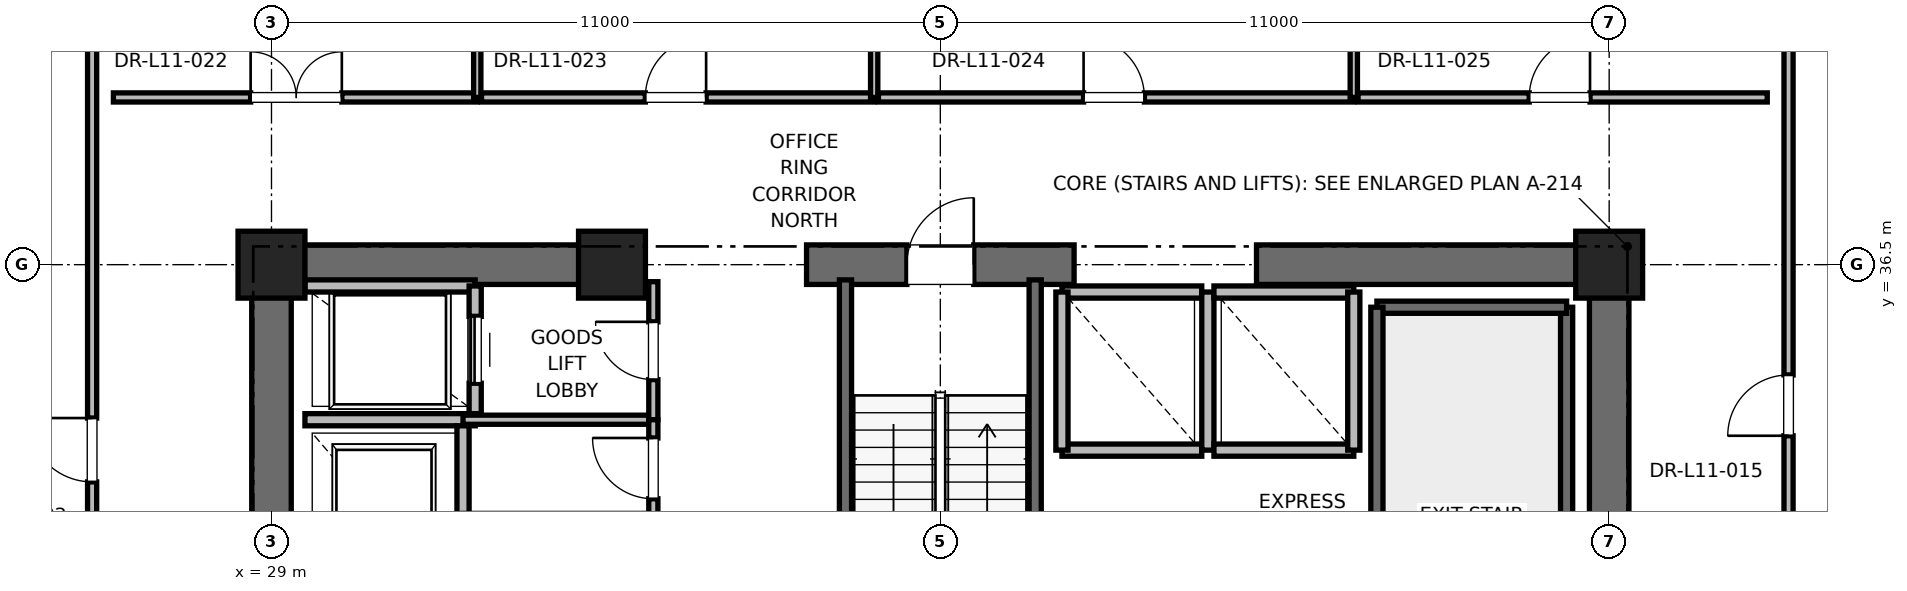
"""IFC4 building model, lengths in metres.
Left out: names, types, materials, properties, quantities, classifications, styles, units other than length and angle.
Written with IfcOpenShell. Run it as: python <this file> out.ifc"""

import sys

from ifc_helpers import new_model, si_unit, direction, frame, frame_2d, origin, origin_2d, place, context, subcontext, project, spatial, rectangle, extrude, element, fill, save


model = new_model("IFC4")
c1 = context("Model", 3, precision=1e-05, world=origin(), true_north=direction((0.0, 1.0)))
c2 = subcontext(c1, "Body", "Model", "MODEL_VIEW")
j1 = project(units=[si_unit("LENGTHUNIT", "METRE"), si_unit("PLANEANGLEUNIT", "RADIAN")], contexts=[c1])
p1 = place(None, origin())
s1 = spatial("IfcSite", under=j1, at=p1, CompositionType="ELEMENT")
p2 = place(p1, origin())
s2 = spatial("IfcBuilding", under=s1, at=p2, CompositionType="ELEMENT")
p3 = place(p2, frame((0.0, 0.0, 51.6)))
s3 = spatial("IfcBuildingStorey", under=s2, at=p3, CompositionType="ELEMENT", Elevation=51.6)
for number, where, z_axis, x_axis in (
    (1, (29.0, 36.5, 0.0), (0.0, 0.0, 1.0), (1.0, 0.0, 0.0)),
    (2, (51.0, 36.5, 0.0), (0.0, 0.0, 1.0), (1.0, 0.0, 0.0)),
    (3, (34.6, 36.5, 0.0), (0.0, 0.0, 1.0), (1.0, 0.0, 0.0)),
):
    element("IfcColumn", number, at=place(p3, frame(where, z_axis=z_axis, x_axis=x_axis)), inside=s3, PredefinedType="PILASTER", context=c2, shape_type="SweptSolid", body=[
        extrude(rectangle(XDim=1.1, YDim=1.1, at=origin_2d()), origin(), (0.0, 0.0, 1.0), 4.0),
    ])
p4 = place(p3, frame((29.0, 36.5, 0.0), z_axis=(0.0, 0.0, 1.0), x_axis=(1.0, 0.0, 0.0)))
e4 = element("IfcWall", 4, at=p4, inside=s3, PredefinedType="SHEAR", context=c2, shape_type="SweptSolid", body=[
    extrude(rectangle(XDim=5.8, YDim=0.65, at=frame_2d((2.9, 0.0))), origin(), (0.0, 0.0, 1.0), 3.76),
])
p5 = place(p3, frame((37.8, 36.5, 0.0), z_axis=(0.0, 0.0, 1.0), x_axis=(1.0, 0.0, 0.0)))
e5 = element("IfcWall", 5, at=p5, inside=s3, PredefinedType="SHEAR", context=c2, shape_type="SweptSolid", body=[
    extrude(rectangle(XDim=4.4, YDim=0.65, at=frame_2d((2.2, 0.0))), origin(), (0.0, 0.0, 1.0), 3.76),
])
p6 = place(p5, frame((1.65, 0.0, 0.0)))
e6 = element("IfcOpeningElement", 6, at=p6, cuts=e5, PredefinedType="OPENING", context=c2, shape_type="SweptSolid", body=[
    extrude(rectangle(XDim=1.1, YDim=2.15, at=frame_2d((0.55, 1.075))), frame((0.0, 0.325, 0.0), z_axis=(0.0, -1.0, 0.0), x_axis=(1.0, 0.0, 0.0)), (0.0, 0.0, 1.0), 0.65),
])
for number, where, z_axis, x_axis in (
    (7, (45.2, 36.5, 0.0), (0.0, 0.0, 1.0), (1.0, 0.0, 0.0)),
    (8, (29.0, 30.7, 0.0), (0.0, 0.0, 1.0), (0.0, 1.0, 0.0)),
):
    element("IfcWall", number, at=place(p3, frame(where, z_axis=z_axis, x_axis=x_axis)), inside=s3, PredefinedType="SHEAR", context=c2, shape_type="SweptSolid", body=[
        extrude(rectangle(XDim=5.8, YDim=0.65, at=frame_2d((2.9, 0.0))), origin(), (0.0, 0.0, 1.0), 3.76),
    ])
p7 = place(p3, frame((51.0, 27.7, 0.0), z_axis=(0.0, 0.0, 1.0), x_axis=(0.0, 1.0, 0.0)))
e9 = element("IfcWall", 9, at=p7, inside=s3, PredefinedType="SHEAR", context=c2, shape_type="SweptSolid", body=[
    extrude(rectangle(XDim=8.8, YDim=0.65, at=frame_2d((4.4, 0.0))), origin(), (0.0, 0.0, 1.0), 3.76),
])
p8 = place(p3, frame((50.3, 27.65, 0.0), z_axis=(0.0, 0.0, 1.0), x_axis=(0.0, 1.0, 0.0)))
e10 = element("IfcWall", 10, at=p8, inside=s3, PredefinedType="SOLIDWALL", context=c2, shape_type="SweptSolid", body=[
    extrude(rectangle(XDim=8.15, YDim=0.2, at=frame_2d((4.075, 0.0))), origin(), (0.0, 0.0, 1.0), 3.76),
])
p9 = place(p3, frame((47.18, 35.8, 0.0), z_axis=(0.0, 0.0, 1.0), x_axis=(1.0, 0.0, 0.0)))
e11 = element("IfcWall", 11, at=p9, inside=s3, PredefinedType="SOLIDWALL", context=c2, shape_type="SweptSolid", body=[
    extrude(rectangle(XDim=3.12, YDim=0.2, at=frame_2d((1.56, 0.0))), origin(), (0.0, 0.0, 1.0), 3.76),
])
p10 = place(p3, frame((47.18, 27.62, 0.0), z_axis=(0.0, 0.0, 1.0), x_axis=(0.0, 1.0, 0.0)))
e12 = element("IfcWall", 12, at=p10, inside=s3, PredefinedType="SOLIDWALL", context=c2, shape_type="SweptSolid", body=[
    extrude(rectangle(XDim=8.18, YDim=0.2, at=frame_2d((4.09, 0.0))), origin(), (0.0, 0.0, 1.0), 3.76),
])
p11 = place(p3, frame((38.44, 27.38, 0.0), z_axis=(0.0, 0.0, 1.0), x_axis=(0.0, 1.0, 0.0)))
e13 = element("IfcWall", 13, at=p11, inside=s3, PredefinedType="SOLIDWALL", context=c2, shape_type="SweptSolid", body=[
    extrude(rectangle(XDim=8.87, YDim=0.2, at=frame_2d((4.435, 0.0))), origin(), (0.0, 0.0, 1.0), 3.76),
])
p12 = place(p3, frame((41.56, 27.68, 0.0), z_axis=(0.0, 0.0, 1.0), x_axis=(0.0, 1.0, 0.0)))
e14 = element("IfcWall", 14, at=p12, inside=s3, PredefinedType="SOLIDWALL", context=c2, shape_type="SweptSolid", body=[
    extrude(rectangle(XDim=8.57, YDim=0.2, at=frame_2d((4.285, 0.0))), origin(), (0.0, 0.0, 1.0), 3.76),
])
p13 = place(p3, frame((29.55, 33.95, 0.0), z_axis=(0.0, 0.0, 1.0), x_axis=(1.0, 0.0, 0.0)))
e15 = element("IfcWall", 15, at=p13, inside=s3, PredefinedType="SOLIDWALL", context=c2, shape_type="SweptSolid", body=[
    extrude(rectangle(XDim=2.8, YDim=0.2, at=frame_2d((1.4, 0.0))), origin(), (0.0, 0.0, 1.0), 3.76),
])
p14 = place(p3, frame((32.15, 30.85, 0.0), z_axis=(0.0, 0.0, 1.0), x_axis=(0.0, 1.0, 0.0)))
e16 = element("IfcWall", 16, at=p14, inside=s3, PredefinedType="SOLIDWALL", context=c2, shape_type="SweptSolid", body=[
    extrude(rectangle(XDim=3.0, YDim=0.2, at=frame_2d((1.5, 0.0))), origin(), (0.0, 0.0, 1.0), 3.76),
])
p15 = place(p3, frame((32.35, 36.15, 0.0), z_axis=(0.0, 0.0, 1.0), x_axis=(-1.0, 0.0, 0.0)))
e17 = element("IfcWall", 17, at=p15, inside=s3, PredefinedType="SOLIDWALL", context=c2, shape_type="SweptSolid", body=[
    extrude(rectangle(XDim=2.8, YDim=0.2, at=frame_2d((1.4, 0.0))), origin(), (0.0, 0.0, 1.0), 2.889),
])
p16 = place(p3, frame((32.35, 34.05, 0.0), z_axis=(0.0, 0.0, 1.0), x_axis=(0.0, 1.0, 0.0)))
e18 = element("IfcWall", 18, at=p16, inside=s3, PredefinedType="SOLIDWALL", context=c2, shape_type="SweptSolid", body=[
    extrude(rectangle(XDim=2.1, YDim=0.2, at=frame_2d((1.05, 0.0))), origin(), (0.0, 0.0, 1.0), 3.76),
])
p17 = place(p16, frame((0.5, 0.0, 0.0)))
e19 = element("IfcOpeningElement", 19, at=p17, cuts=e18, PredefinedType="OPENING", context=c2, shape_type="SweptSolid", body=[
    extrude(rectangle(XDim=1.1, YDim=2.2, at=frame_2d((0.55, 1.1))), frame((0.0, 0.1, 0.0), z_axis=(0.0, -1.0, 0.0), x_axis=(1.0, 0.0, 0.0)), (0.0, 0.0, 1.0), 0.2),
])
p18 = place(p3, frame((42.0, 33.45, 0.0), z_axis=(0.0, 0.0, 1.0), x_axis=(1.0, 0.0, 0.0)))
e20 = element("IfcWall", 20, at=p18, inside=s3, PredefinedType="SOLIDWALL", context=c2, shape_type="SweptSolid", body=[
    extrude(rectangle(XDim=2.3, YDim=0.2, at=frame_2d((1.15, 0.0))), origin(), (0.0, 0.0, 1.0), 3.76),
])
p19 = place(p3, frame((44.3, 36.05, 0.0), z_axis=(0.0, 0.0, 1.0), x_axis=(-1.0, 0.0, 0.0)))
e21 = element("IfcWall", 21, at=p19, inside=s3, PredefinedType="SOLIDWALL", context=c2, shape_type="SweptSolid", body=[
    extrude(rectangle(XDim=2.3, YDim=0.2, at=frame_2d((1.15, 0.0))), origin(), (0.0, 0.0, 1.0), 2.54),
])
for number, where, z_axis, x_axis in (
    (22, (42.0, 36.05, 0.0), (0.0, 0.0, 1.0), (0.0, -1.0, 0.0)),
    (23, (44.4, 33.45, 0.0), (0.0, 0.0, 1.0), (0.0, 1.0, 0.0)),
):
    element("IfcWall", number, at=place(p3, frame(where, z_axis=z_axis, x_axis=x_axis)), inside=s3, PredefinedType="SOLIDWALL", context=c2, shape_type="SweptSolid", body=[
        extrude(rectangle(XDim=2.6, YDim=0.2, at=frame_2d((1.3, 0.0))), origin(), (0.0, 0.0, 1.0), 2.54),
    ])
p20 = place(p3, frame((44.5, 33.45, 0.0), z_axis=(0.0, 0.0, 1.0), x_axis=(1.0, 0.0, 0.0)))
e24 = element("IfcWall", 24, at=p20, inside=s3, PredefinedType="SOLIDWALL", context=c2, shape_type="SweptSolid", body=[
    extrude(rectangle(XDim=2.3, YDim=0.2, at=frame_2d((1.15, 0.0))), origin(), (0.0, 0.0, 1.0), 3.76),
])
p21 = place(p3, frame((46.8, 36.05, 0.0), z_axis=(0.0, 0.0, 1.0), x_axis=(-1.0, 0.0, 0.0)))
e25 = element("IfcWall", 25, at=p21, inside=s3, PredefinedType="SOLIDWALL", context=c2, shape_type="SweptSolid", body=[
    extrude(rectangle(XDim=2.3, YDim=0.2, at=frame_2d((1.15, 0.0))), origin(), (0.0, 0.0, 1.0), 2.54),
])
p22 = place(p3, frame((46.8, 33.45, 0.0), z_axis=(0.0, 0.0, 1.0), x_axis=(0.0, 1.0, 0.0)))
e26 = element("IfcWall", 26, at=p22, inside=s3, PredefinedType="SOLIDWALL", context=c2, shape_type="SweptSolid", body=[
    extrude(rectangle(XDim=2.6, YDim=0.2, at=frame_2d((1.3, 0.0))), origin(), (0.0, 0.0, 1.0), 3.76),
])
p23 = place(p3, frame((32.15, 33.95, 0.0), z_axis=(0.0, 0.0, 1.0), x_axis=(1.0, 0.0, 0.0)))
e27 = element("IfcWall", 27, at=p23, inside=s3, PredefinedType="PARTITIONING", context=c2, shape_type="SweptSolid", body=[
    extrude(rectangle(XDim=3.13, YDim=0.15, at=frame_2d((1.565, 0.0))), origin(), (0.0, 0.0, 1.0), 2.85),
])
p24 = place(p3, frame((35.28, 33.95, 0.0), z_axis=(0.0, 0.0, 1.0), x_axis=(0.0, 1.0, 0.0)))
e28 = element("IfcWall", 28, at=p24, inside=s3, PredefinedType="PARTITIONING", context=c2, shape_type="SweptSolid", body=[
    extrude(rectangle(XDim=2.27, YDim=0.15, at=frame_2d((1.135, 0.0))), origin(), (0.0, 0.0, 1.0), 2.54),
])
p25 = place(p24, frame((0.66, 0.0, 0.0)))
e29 = element("IfcOpeningElement", 29, at=p25, cuts=e28, PredefinedType="OPENING", context=c2, shape_type="SweptSolid", body=[
    extrude(rectangle(XDim=0.95, YDim=2.15, at=frame_2d((0.475, 1.075))), frame((0.0, 0.075, 0.0), z_axis=(0.0, -1.0, 0.0), x_axis=(1.0, 0.0, 0.0)), (0.0, 0.0, 1.0), 0.15),
])
p26 = place(p3, frame((35.28, 32.35, 0.0), z_axis=(0.0, 0.0, 1.0), x_axis=(0.0, 1.0, 0.0)))
e30 = element("IfcWall", 30, at=p26, inside=s3, PredefinedType="PARTITIONING", context=c2, shape_type="SweptSolid", body=[
    extrude(rectangle(XDim=1.6, YDim=0.15, at=frame_2d((0.8, 0.0))), origin(), (0.0, 0.0, 1.0), 2.85),
])
p27 = place(p26, frame((0.3, 0.0, 0.0)))
e31 = element("IfcOpeningElement", 31, at=p27, cuts=e30, PredefinedType="OPENING", context=c2, shape_type="SweptSolid", body=[
    extrude(rectangle(XDim=1.0, YDim=2.15, at=frame_2d((0.5, 1.075))), frame((0.0, 0.075, 0.0), z_axis=(0.0, -1.0, 0.0), x_axis=(1.0, 0.0, 0.0)), (0.0, 0.0, 1.0), 0.15),
])
p28 = place(p3, frame((26.4, 39.25, 0.0), z_axis=(0.0, 0.0, 1.0), x_axis=(1.0, 0.0, 0.0)))
e32 = element("IfcWall", 32, at=p28, inside=s3, PredefinedType="PARTITIONING", context=c2, shape_type="SweptSolid", body=[
    extrude(rectangle(XDim=5.984, YDim=0.15, at=frame_2d((2.992, 0.0))), origin(), (0.0, 0.0, 1.0), 2.85),
])
p29 = place(p28, frame((2.257, 0.0, 0.0)))
e33 = element("IfcOpeningElement", 33, at=p29, cuts=e32, PredefinedType="OPENING", context=c2, shape_type="SweptSolid", body=[
    extrude(rectangle(XDim=1.5, YDim=2.25, at=frame_2d((0.75, 1.125))), frame((0.0, 0.075, 0.0), z_axis=(0.0, -1.0, 0.0), x_axis=(1.0, 0.0, 0.0)), (0.0, 0.0, 1.0), 0.15),
])
p30 = place(p3, frame((32.384, 39.25, 0.0), z_axis=(0.0, 0.0, 1.0), x_axis=(0.0, 1.0, 0.0)))
e34 = element("IfcWall", 34, at=p30, inside=s3, PredefinedType="PARTITIONING", context=c2, shape_type="SweptSolid", body=[
    extrude(rectangle(XDim=10.296, YDim=0.12, at=frame_2d((5.148, 0.0))), origin(), (0.0, 0.0, 1.0), 2.39),
])
p31 = place(p3, frame((32.454, 39.25, 0.0), z_axis=(0.0, 0.0, 1.0), x_axis=(1.0, 0.0, 0.0)))
e35 = element("IfcWall", 35, at=p31, inside=s3, PredefinedType="PARTITIONING", context=c2, shape_type="SweptSolid", body=[
    extrude(rectangle(XDim=6.458, YDim=0.15, at=frame_2d((3.229, 0.0))), origin(), (0.0, 0.0, 1.0), 2.85),
])
p32 = place(p31, frame((2.694, 0.0, 0.0)))
e36 = element("IfcOpeningElement", 36, at=p32, cuts=e35, PredefinedType="OPENING", context=c2, shape_type="SweptSolid", body=[
    extrude(rectangle(XDim=1.0, YDim=2.15, at=frame_2d((0.5, 1.075))), frame((0.0, 0.075, 0.0), z_axis=(0.0, -1.0, 0.0), x_axis=(1.0, 0.0, 0.0)), (0.0, 0.0, 1.0), 0.15),
])
p33 = place(p3, frame((38.912, 39.25, 0.0), z_axis=(0.0, 0.0, 1.0), x_axis=(0.0, 1.0, 0.0)))
e37 = element("IfcWall", 37, at=p33, inside=s3, PredefinedType="PARTITIONING", context=c2, shape_type="SweptSolid", body=[
    extrude(rectangle(XDim=10.296, YDim=0.12, at=frame_2d((5.148, 0.0))), origin(), (0.0, 0.0, 1.0), 2.39),
])
p34 = place(p3, frame((38.982, 39.25, 0.0), z_axis=(0.0, 0.0, 1.0), x_axis=(1.0, 0.0, 0.0)))
e38 = element("IfcWall", 38, at=p34, inside=s3, PredefinedType="PARTITIONING", context=c2, shape_type="SweptSolid", body=[
    extrude(rectangle(XDim=7.818, YDim=0.15, at=frame_2d((3.909, 0.0))), origin(), (0.0, 0.0, 1.0), 2.85),
])
p35 = place(p34, frame((3.374, 0.0, 0.0)))
e39 = element("IfcOpeningElement", 39, at=p35, cuts=e38, PredefinedType="OPENING", context=c2, shape_type="SweptSolid", body=[
    extrude(rectangle(XDim=1.0, YDim=2.15, at=frame_2d((0.5, 1.075))), frame((0.0, 0.075, 0.0), z_axis=(0.0, -1.0, 0.0), x_axis=(1.0, 0.0, 0.0)), (0.0, 0.0, 1.0), 0.15),
])
p36 = place(p3, frame((46.8, 39.25, 0.0), z_axis=(0.0, 0.0, 1.0), x_axis=(0.0, 1.0, 0.0)))
e40 = element("IfcWall", 40, at=p36, inside=s3, PredefinedType="PARTITIONING", context=c2, shape_type="SweptSolid", body=[
    extrude(rectangle(XDim=10.296, YDim=0.12, at=frame_2d((5.148, 0.0))), origin(), (0.0, 0.0, 1.0), 2.39),
])
p37 = place(p3, frame((46.87, 39.25, 0.0), z_axis=(0.0, 0.0, 1.0), x_axis=(1.0, 0.0, 0.0)))
e41 = element("IfcWall", 41, at=p37, inside=s3, PredefinedType="PARTITIONING", context=c2, shape_type="SweptSolid", body=[
    extrude(rectangle(XDim=6.73, YDim=0.15, at=frame_2d((3.365, 0.0))), origin(), (0.0, 0.0, 1.0), 2.85),
])
p38 = place(p37, frame((2.815, 0.0, 0.0)))
e42 = element("IfcOpeningElement", 42, at=p38, cuts=e41, PredefinedType="OPENING", context=c2, shape_type="SweptSolid", body=[
    extrude(rectangle(XDim=1.0, YDim=2.15, at=frame_2d((0.5, 1.075))), frame((0.0, 0.075, 0.0), z_axis=(0.0, -1.0, 0.0), x_axis=(1.0, 0.0, 0.0)), (0.0, 0.0, 1.0), 0.15),
])
p39 = place(p3, frame((26.05, 30.505, 0.0), z_axis=(0.0, 0.0, 1.0), x_axis=(0.0, 1.0, 0.0)))
e43 = element("IfcWall", 43, at=p39, inside=s3, PredefinedType="PARTITIONING", context=c2, shape_type="SweptSolid", body=[
    extrude(rectangle(XDim=15.341, YDim=0.15, at=frame_2d((7.67, 0.0))), origin(), (0.0, 0.0, 1.0), 2.85),
])
p40 = place(p39, frame((2.422, 0.0, 0.0)))
e44 = element("IfcOpeningElement", 44, at=p40, cuts=e43, PredefinedType="OPENING", context=c2, shape_type="SweptSolid", body=[
    extrude(rectangle(XDim=1.05, YDim=2.2, at=frame_2d((0.525, 1.1))), frame((0.0, 0.075, 0.0), z_axis=(0.0, -1.0, 0.0), x_axis=(1.0, 0.0, 0.0)), (0.0, 0.0, 1.0), 0.15),
])
p41 = place(p3, frame((53.95, 31.973, 0.0), z_axis=(0.0, 0.0, 1.0), x_axis=(0.0, 1.0, 0.0)))
e45 = element("IfcWall", 45, at=p41, inside=s3, PredefinedType="PARTITIONING", context=c2, shape_type="SweptSolid", body=[
    extrude(rectangle(XDim=13.873, YDim=0.15, at=frame_2d((6.937, 0.0))), origin(), (0.0, 0.0, 1.0), 2.85),
])
p42 = place(p41, frame((1.713, 0.0, 0.0)))
e46 = element("IfcOpeningElement", 46, at=p42, cuts=e45, PredefinedType="OPENING", context=c2, shape_type="SweptSolid", body=[
    extrude(rectangle(XDim=1.0, YDim=2.15, at=frame_2d((0.5, 1.075))), frame((0.0, 0.075, 0.0), z_axis=(0.0, -1.0, 0.0), x_axis=(1.0, 0.0, 0.0)), (0.0, 0.0, 1.0), 0.15),
])
p43 = place(p6, origin())
e47 = element("IfcDoor", 47, at=p43, inside=s3, OperationType="SINGLE_SWING_RIGHT", PredefinedType="DOOR", context=c2, shape_type="SweptSolid", body=[
    extrude(rectangle(XDim=1.1, YDim=2.15, at=frame_2d((0.55, 1.075))), frame((0.0, 0.025, 0.0), z_axis=(0.0, -1.0, 0.0), x_axis=(1.0, 0.0, 0.0)), (0.0, 0.0, 1.0), 0.05),
])
fill(e6, e47)
p44 = place(p17, origin())
e48 = element("IfcDoor", 48, at=p44, inside=s3, OperationType="SLIDING_TO_RIGHT", PredefinedType="DOOR", context=c2, shape_type="SweptSolid", body=[
    extrude(rectangle(XDim=1.1, YDim=2.2, at=frame_2d((0.55, 1.1))), frame((0.0, 0.025, 0.0), z_axis=(0.0, -1.0, 0.0), x_axis=(1.0, 0.0, 0.0)), (0.0, 0.0, 1.0), 0.05),
])
fill(e19, e48)
p45 = place(p25, origin())
e49 = element("IfcDoor", 49, at=p45, inside=s3, OperationType="SINGLE_SWING_RIGHT", PredefinedType="DOOR", context=c2, shape_type="SweptSolid", body=[
    extrude(rectangle(XDim=0.95, YDim=2.15, at=frame_2d((0.475, 1.075))), frame((0.0, 0.025, 0.0), z_axis=(0.0, -1.0, 0.0), x_axis=(1.0, 0.0, 0.0)), (0.0, 0.0, 1.0), 0.05),
])
fill(e29, e49)
p46 = place(p27, origin())
e50 = element("IfcDoor", 50, at=p46, inside=s3, OperationType="SINGLE_SWING_RIGHT", PredefinedType="DOOR", context=c2, shape_type="SweptSolid", body=[
    extrude(rectangle(XDim=1.0, YDim=2.15, at=frame_2d((0.5, 1.075))), frame((0.0, 0.025, 0.0), z_axis=(0.0, -1.0, 0.0), x_axis=(1.0, 0.0, 0.0)), (0.0, 0.0, 1.0), 0.05),
])
fill(e31, e50)
p47 = place(p29, origin())
e51 = element("IfcDoor", 51, at=p47, inside=s3, OperationType="DOUBLE_DOOR_SINGLE_SWING", PredefinedType="DOOR", context=c2, shape_type="SweptSolid", body=[
    extrude(rectangle(XDim=1.5, YDim=2.25, at=frame_2d((0.75, 1.125))), frame((0.0, 0.025, 0.0), z_axis=(0.0, -1.0, 0.0), x_axis=(1.0, 0.0, 0.0)), (0.0, 0.0, 1.0), 0.05),
])
fill(e33, e51)
p48 = place(p32, origin())
e52 = element("IfcDoor", 52, at=p48, inside=s3, OperationType="SINGLE_SWING_RIGHT", PredefinedType="DOOR", context=c2, shape_type="SweptSolid", body=[
    extrude(rectangle(XDim=1.0, YDim=2.15, at=frame_2d((0.5, 1.075))), frame((0.0, 0.025, 0.0), z_axis=(0.0, -1.0, 0.0), x_axis=(1.0, 0.0, 0.0)), (0.0, 0.0, 1.0), 0.05),
])
fill(e36, e52)
p49 = place(p35, origin())
e53 = element("IfcDoor", 53, at=p49, inside=s3, OperationType="SINGLE_SWING_LEFT", PredefinedType="DOOR", context=c2, shape_type="SweptSolid", body=[
    extrude(rectangle(XDim=1.0, YDim=2.15, at=frame_2d((0.5, 1.075))), frame((0.0, 0.025, 0.0), z_axis=(0.0, -1.0, 0.0), x_axis=(1.0, 0.0, 0.0)), (0.0, 0.0, 1.0), 0.05),
])
fill(e39, e53)
p50 = place(p38, origin())
e54 = element("IfcDoor", 54, at=p50, inside=s3, OperationType="SINGLE_SWING_RIGHT", PredefinedType="DOOR", context=c2, shape_type="SweptSolid", body=[
    extrude(rectangle(XDim=1.0, YDim=2.15, at=frame_2d((0.5, 1.075))), frame((0.0, 0.025, 0.0), z_axis=(0.0, -1.0, 0.0), x_axis=(1.0, 0.0, 0.0)), (0.0, 0.0, 1.0), 0.05),
])
fill(e42, e54)
p51 = place(p40, origin())
e55 = element("IfcDoor", 55, at=p51, inside=s3, OperationType="SINGLE_SWING_RIGHT", PredefinedType="DOOR", context=c2, shape_type="SweptSolid", body=[
    extrude(rectangle(XDim=1.05, YDim=2.2, at=frame_2d((0.525, 1.1))), frame((0.0, 0.025, 0.0), z_axis=(0.0, -1.0, 0.0), x_axis=(1.0, 0.0, 0.0)), (0.0, 0.0, 1.0), 0.05),
])
fill(e44, e55)
p52 = place(p42, origin())
e56 = element("IfcDoor", 56, at=p52, inside=s3, OperationType="SINGLE_SWING_LEFT", PredefinedType="DOOR", context=c2, shape_type="SweptSolid", body=[
    extrude(rectangle(XDim=1.0, YDim=2.15, at=frame_2d((0.5, 1.075))), frame((0.0, 0.025, 0.0), z_axis=(0.0, -1.0, 0.0), x_axis=(1.0, 0.0, 0.0)), (0.0, 0.0, 1.0), 0.05),
])
fill(e46, e56)
save(model, sys.argv[1])
